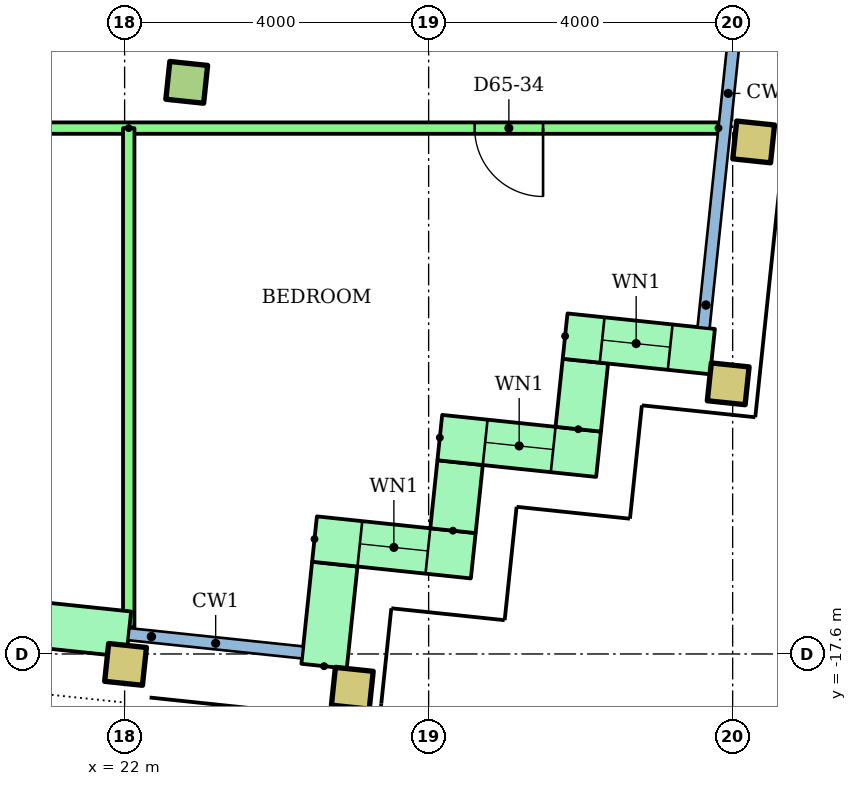
"""IFC4 building model, lengths in metres.
Left out: names, types, materials, properties, quantities, classifications, styles, units other than length and angle.
Written with IfcOpenShell. Run it as: python <this file> out.ifc"""

import sys

from ifc_helpers import new_model, si_unit, direction, frame, frame_2d, origin, origin_2d, place, context, subcontext, project, spatial, rectangle, hollow_rectangle, extrude, element, fill, save


model = new_model("IFC4")
c1 = context("Model", 3, precision=1e-05, world=origin(), true_north=direction((0.0, 1.0)))
c2 = subcontext(c1, "Body", "Model", "MODEL_VIEW")
j1 = project(units=[si_unit("LENGTHUNIT", "METRE"), si_unit("PLANEANGLEUNIT", "RADIAN")], contexts=[c1])
p1 = place(None, origin())
s1 = spatial("IfcSite", under=j1, at=p1, CompositionType="ELEMENT")
p2 = place(p1, origin())
s2 = spatial("IfcBuilding", under=s1, at=p2, CompositionType="ELEMENT")
p3 = place(p2, frame((0.0, 0.0, 253.1)))
s3 = spatial("IfcBuildingStorey", under=s2, at=p3, CompositionType="ELEMENT", Elevation=253.1)
for number, where, z_axis, x_axis in (
    (1, (22.012, -17.737, 0.0), (0.0, 0.0, 1.0), (0.995, -0.105, 0.0)),
    (2, (24.996, -18.051, 0.0), (0.0, 0.0, 1.0), (0.995, -0.105, 0.0)),
    (3, (29.942, -14.046, 0.0), (0.0, 0.0, 1.0), (0.995, -0.105, 0.0)),
):
    element("IfcColumn", number, at=place(p3, frame(where, z_axis=z_axis, x_axis=x_axis)), inside=s3, PredefinedType="COLUMN", context=c2, shape_type="SweptSolid", body=[
        extrude(hollow_rectangle(XDim=0.5, YDim=0.5, WallThickness=0.025, at=origin_2d()), origin(), (0.0, 0.0, 1.0), 3.2),
    ])
p4 = place(p3, frame((22.817, -10.08, 0.0), z_axis=(0.0, 0.0, 1.0), x_axis=(0.994521895368, -0.104528463268, 0.0)))
e4 = element("IfcColumn", 4, at=p4, inside=s3, PredefinedType="COLUMN", context=c2, shape_type="SweptSolid", body=[
    extrude(rectangle(XDim=0.5, YDim=0.5, at=origin_2d()), origin(), (0.0, 0.0, 1.0), 3.2),
])
p5 = place(p3, frame((30.276, -10.864, 0.0), z_axis=(0.0, 0.0, 1.0), x_axis=(0.994521895368, -0.104528463268, 0.0)))
e5 = element("IfcColumn", 5, at=p5, inside=s3, PredefinedType="COLUMN", context=c2, shape_type="SweptSolid", body=[
    extrude(hollow_rectangle(XDim=0.5, YDim=0.5, WallThickness=0.025, at=origin_2d()), origin(), (0.0, 0.0, 1.0), 3.2),
])
p6 = place(p3, frame((18.076, -16.921, 0.0), z_axis=(0.0, 0.0, 1.0), x_axis=(0.994519156568, -0.104554517933, 0.0)))
e6 = element("IfcWall", 6, at=p6, inside=s3, PredefinedType="STANDARD", context=c2, shape_type="SweptSolid", body=[
    extrude(rectangle(XDim=4.0, YDim=0.6, at=frame_2d((2.0, 0.0))), origin(), (0.0, 0.0, 1.0), 2.92),
])
p7 = place(p6, frame((1.4, 0.0, 0.0)))
e7 = element("IfcOpeningElement", 7, at=p7, cuts=e6, PredefinedType="OPENING", context=c2, shape_type="SweptSolid", body=[
    extrude(rectangle(XDim=1.2, YDim=2.1, at=frame_2d((0.6, 1.05))), frame((0.0, 0.31, 0.0), z_axis=(0.0, -1.0, 0.0), x_axis=(1.0, 0.0, 0.0)), (0.0, 0.0, 1.0), 0.62),
])
p8 = place(p3, frame((24.625, -17.76, 0.0), z_axis=(0.0, 0.0, 1.0), x_axis=(0.104355269718, 0.994540083497, 0.0)))
e8 = element("IfcWall", 8, at=p8, inside=s3, PredefinedType="STANDARD", context=c2, shape_type="SweptSolid", body=[
    extrude(rectangle(XDim=1.35, YDim=0.6, at=frame_2d((0.675, 0.0))), origin(), (0.0, 0.0, 1.0), 2.92),
])
p9 = place(p3, frame((24.499, -16.088, 0.0), z_axis=(0.0, 0.0, 1.0), x_axis=(0.994522640205, -0.104521376379, 0.0)))
e9 = element("IfcWall", 9, at=p9, inside=s3, PredefinedType="STANDARD", context=c2, shape_type="SweptSolid", body=[
    extrude(rectangle(XDim=2.1, YDim=0.6, at=frame_2d((1.05, 0.0))), origin(), (0.0, 0.0, 1.0), 2.92),
])
p10 = place(p9, frame((0.6, 0.0, 0.9)))
e10 = element("IfcOpeningElement", 10, at=p10, cuts=e9, PredefinedType="OPENING", context=c2, shape_type="SweptSolid", body=[
    extrude(rectangle(XDim=0.9, YDim=1.5, at=frame_2d((0.45, 0.75))), frame((0.0, 0.31, 0.0), z_axis=(0.0, -1.0, 0.0), x_axis=(1.0, 0.0, 0.0)), (0.0, 0.0, 1.0), 0.62),
])
p11 = place(p3, frame((26.32, -15.978, 0.0), z_axis=(0.0, 0.0, 1.0), x_axis=(0.104444712852, 0.994530694326, 0.0)))
e11 = element("IfcWall", 11, at=p11, inside=s3, PredefinedType="STANDARD", context=c2, shape_type="SweptSolid", body=[
    extrude(rectangle(XDim=0.9, YDim=0.6, at=frame_2d((0.45, 0.0))), origin(), (0.0, 0.0, 1.0), 2.92),
])
p12 = place(p3, frame((26.147, -14.753, 0.0), z_axis=(0.0, 0.0, 1.0), x_axis=(0.994522640205, -0.104521376379, 0.0)))
e12 = element("IfcWall", 12, at=p12, inside=s3, PredefinedType="STANDARD", context=c2, shape_type="SweptSolid", body=[
    extrude(rectangle(XDim=2.1, YDim=0.6, at=frame_2d((1.05, 0.0))), origin(), (0.0, 0.0, 1.0), 2.92),
])
p13 = place(p12, frame((0.6, 0.0, 0.9)))
e13 = element("IfcOpeningElement", 13, at=p13, cuts=e12, PredefinedType="OPENING", context=c2, shape_type="SweptSolid", body=[
    extrude(rectangle(XDim=0.9, YDim=1.5, at=frame_2d((0.45, 0.75))), frame((0.0, 0.31, 0.0), z_axis=(0.0, -1.0, 0.0), x_axis=(1.0, 0.0, 0.0)), (0.0, 0.0, 1.0), 0.62),
])
p14 = place(p3, frame((27.969, -14.643, 0.0), z_axis=(0.0, 0.0, 1.0), x_axis=(0.104416541099, 0.994533652495, 0.0)))
e14 = element("IfcWall", 14, at=p14, inside=s3, PredefinedType="STANDARD", context=c2, shape_type="SweptSolid", body=[
    extrude(rectangle(XDim=0.9, YDim=0.6, at=frame_2d((0.45, 0.0))), origin(), (0.0, 0.0, 1.0), 2.92),
])
p15 = place(p3, frame((27.796, -13.418, 0.0), z_axis=(0.0, 0.0, 1.0), x_axis=(0.994519850893, -0.104547913319, 0.0)))
e15 = element("IfcWall", 15, at=p15, inside=s3, PredefinedType="STANDARD", context=c2, shape_type="SweptSolid", body=[
    extrude(rectangle(XDim=1.95, YDim=0.6, at=frame_2d((0.975, 0.0))), origin(), (0.0, 0.0, 1.0), 2.92),
])
p16 = place(p15, frame((0.49, 0.0, 0.9)))
e16 = element("IfcOpeningElement", 16, at=p16, cuts=e15, PredefinedType="OPENING", context=c2, shape_type="SweptSolid", body=[
    extrude(rectangle(XDim=0.9, YDim=1.5, at=frame_2d((0.45, 0.75))), frame((0.0, 0.31, 0.0), z_axis=(0.0, -1.0, 0.0), x_axis=(1.0, 0.0, 0.0)), (0.0, 0.0, 1.0), 0.62),
])
p17 = place(p3, frame((29.814, -10.682, 0.0), z_axis=(0.0, 0.0, 1.0), x_axis=(-1.0, 0.0, 0.0)))
e17 = element("IfcWall", 17, at=p17, inside=s3, PredefinedType="PARTITIONING", context=c2, shape_type="SweptSolid", body=[
    extrude(rectangle(XDim=15.716, YDim=0.15, at=frame_2d((7.858, 0.0))), origin(), (0.0, 0.0, 1.0), 2.4),
])
p18 = place(p17, frame((11.238, 0.0, 0.0)))
e18 = element("IfcOpeningElement", 18, at=p18, cuts=e17, PredefinedType="OPENING", context=c2, shape_type="SweptSolid", body=[
    extrude(rectangle(XDim=1.0, YDim=2.1, at=frame_2d((0.5, 1.05))), frame((0.0, 0.085, 0.0), z_axis=(0.0, -1.0, 0.0), x_axis=(1.0, 0.0, 0.0)), (0.0, 0.0, 1.0), 0.17),
])
p19 = place(p17, frame((2.308, 0.0, 0.0)))
e19 = element("IfcOpeningElement", 19, at=p19, cuts=e17, PredefinedType="OPENING", context=c2, shape_type="SweptSolid", body=[
    extrude(rectangle(XDim=0.9, YDim=2.1, at=frame_2d((0.45, 1.05))), frame((0.0, 0.085, 0.0), z_axis=(0.0, -1.0, 0.0), x_axis=(1.0, 0.0, 0.0)), (0.0, 0.0, 1.0), 0.17),
])
p20 = place(p3, frame((22.054, -10.682, 0.0), z_axis=(0.0, 0.0, 1.0), x_axis=(0.0, -1.0, 0.0)))
e20 = element("IfcWall", 20, at=p20, inside=s3, PredefinedType="PARTITIONING", context=c2, shape_type="SweptSolid", body=[
    extrude(rectangle(XDim=6.567, YDim=0.15, at=frame_2d((3.284, 0.0))), origin(), (0.0, 0.0, 1.0), 2.4),
])
p21 = place(p10, origin())
e21 = element("IfcWindow", 21, at=p21, inside=s3, PartitioningType="SINGLE_PANEL", PredefinedType="WINDOW", context=c2, shape_type="SweptSolid", body=[
    extrude(rectangle(XDim=0.9, YDim=1.5, at=frame_2d((0.45, 0.75))), frame((0.0, 0.03, 0.0), z_axis=(0.0, -1.0, 0.0), x_axis=(1.0, 0.0, 0.0)), (0.0, 0.0, 1.0), 0.06),
])
fill(e10, e21)
p22 = place(p13, origin())
e22 = element("IfcWindow", 22, at=p22, inside=s3, PartitioningType="SINGLE_PANEL", PredefinedType="WINDOW", context=c2, shape_type="SweptSolid", body=[
    extrude(rectangle(XDim=0.9, YDim=1.5, at=frame_2d((0.45, 0.75))), frame((0.0, 0.03, 0.0), z_axis=(0.0, -1.0, 0.0), x_axis=(1.0, 0.0, 0.0)), (0.0, 0.0, 1.0), 0.06),
])
fill(e13, e22)
p23 = place(p16, origin())
e23 = element("IfcWindow", 23, at=p23, inside=s3, PartitioningType="SINGLE_PANEL", PredefinedType="WINDOW", context=c2, shape_type="SweptSolid", body=[
    extrude(rectangle(XDim=0.9, YDim=1.5, at=frame_2d((0.45, 0.75))), frame((0.0, 0.03, 0.0), z_axis=(0.0, -1.0, 0.0), x_axis=(1.0, 0.0, 0.0)), (0.0, 0.0, 1.0), 0.06),
])
fill(e16, e23)
p24 = place(p19, origin())
e24 = element("IfcDoor", 24, at=p24, inside=s3, OperationType="SINGLE_SWING_LEFT", PredefinedType="DOOR", context=c2, shape_type="SweptSolid", body=[
    extrude(rectangle(XDim=0.9, YDim=2.1, at=frame_2d((0.45, 1.05))), frame((0.0, 0.025, 0.0), z_axis=(0.0, -1.0, 0.0), x_axis=(1.0, 0.0, 0.0)), (0.0, 0.0, 1.0), 0.05),
])
fill(e19, e24)
save(model, sys.argv[1])
